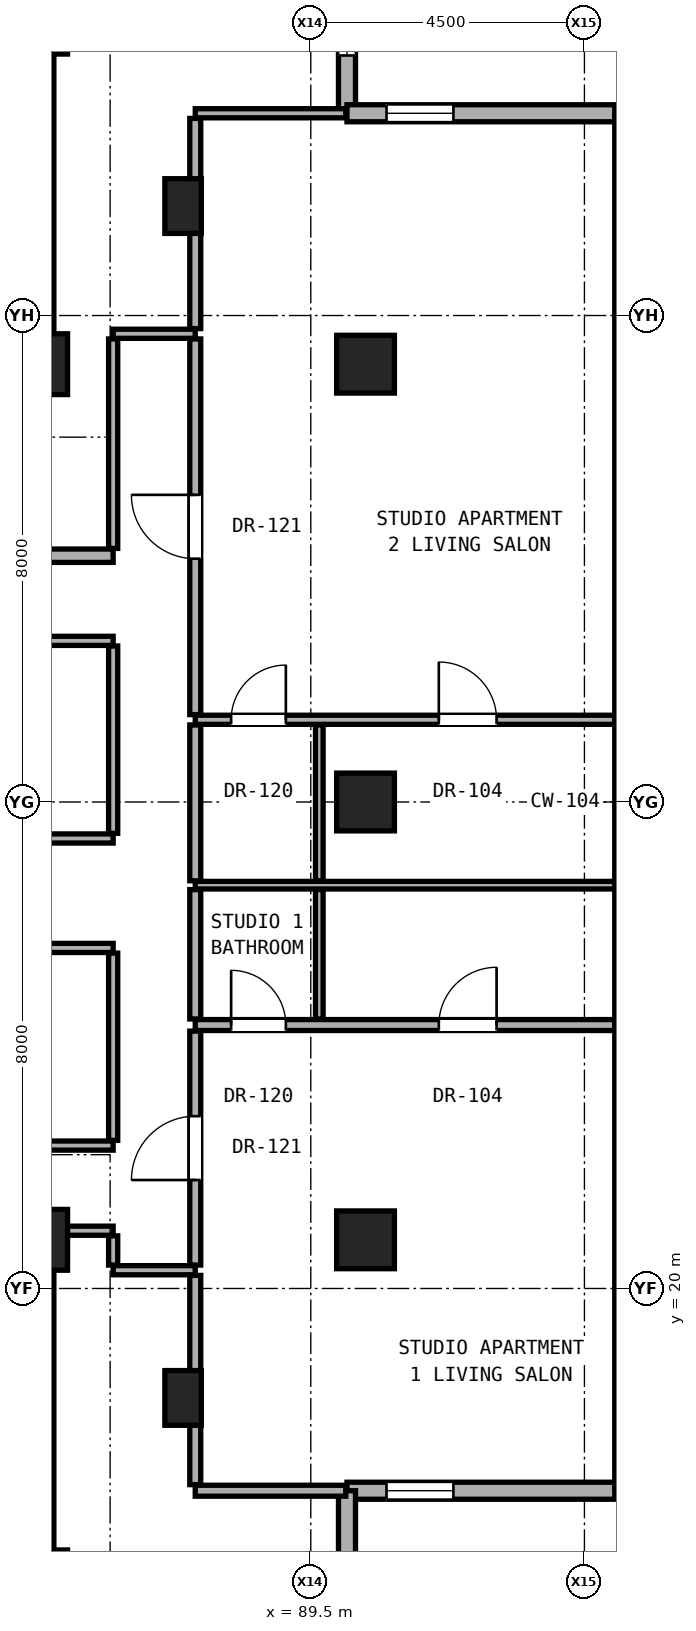
"""IFC4 building model, lengths in metres.
Left out: names, types, materials, properties, quantities, classifications, styles, units other than length and angle.
Written with IfcOpenShell. Run it as: python <this file> out.ifc"""

import sys

from ifc_helpers import new_model, si_unit, direction, frame, frame_2d, origin, origin_2d, place, context, subcontext, project, spatial, rectangle, hollow_rectangle, extrude, element, fill, save


model = new_model("IFC4")
c1 = context("Model", 3, precision=1e-05, world=origin(), true_north=direction((0.0, 1.0)))
c2 = subcontext(c1, "Body", "Model", "MODEL_VIEW")
j1 = project(units=[si_unit("LENGTHUNIT", "METRE"), si_unit("PLANEANGLEUNIT", "RADIAN")], contexts=[c1])
p1 = place(None, origin())
s1 = spatial("IfcSite", under=j1, at=p1, CompositionType="ELEMENT")
p2 = place(p1, origin())
s2 = spatial("IfcBuilding", under=s1, at=p2, CompositionType="ELEMENT")
p3 = place(p2, frame((0.0, 0.0, 173.9)))
s3 = spatial("IfcBuildingStorey", under=s2, at=p3, CompositionType="ELEMENT", Elevation=173.9)
for number, where, z_axis, x_axis in (
    (1, (85.0, 15.2, 0.0), (0.0, 0.0, 1.0), (1.0, 0.0, 0.0)),
    (2, (85.0, 20.8, 0.0), (0.0, 0.0, 1.0), (1.0, 0.0, 0.0)),
    (3, (85.0, 35.2, 0.0), (0.0, 0.0, 1.0), (1.0, 0.0, 0.0)),
    (4, (85.0, 40.8, 0.0), (0.0, 0.0, 1.0), (1.0, 0.0, 0.0)),
):
    element("IfcColumn", number, at=place(p3, frame(where, z_axis=z_axis, x_axis=x_axis)), inside=s3, PredefinedType="COLUMN", context=c2, shape_type="SweptSolid", body=[
        extrude(rectangle(XDim=1.0, YDim=1.0, at=origin_2d()), origin(), (0.0, 0.0, 1.0), 3.25),
    ])
for number, where, z_axis, x_axis in (
    (5, (90.4, 20.8, 0.0), (0.0, 0.0, 1.0), (1.0, 0.0, 0.0)),
    (6, (90.4, 28.0, 0.0), (0.0, 0.0, 1.0), (1.0, 0.0, 0.0)),
    (7, (90.4, 35.2, 0.0), (0.0, 0.0, 1.0), (1.0, 0.0, 0.0)),
):
    element("IfcColumn", number, at=place(p3, frame(where, z_axis=z_axis, x_axis=x_axis)), inside=s3, PredefinedType="COLUMN", context=c2, shape_type="SweptSolid", body=[
        extrude(hollow_rectangle(XDim=0.95, YDim=0.95, WallThickness=0.05, at=origin_2d()), origin(), (0.0, 0.0, 1.0), 3.25),
    ])
for number, where, z_axis, x_axis in (
    (8, (87.4, 18.2, 0.0), (0.0, 0.0, 1.0), (1.0, 0.0, 0.0)),
    (9, (87.4, 37.8, 0.0), (0.0, 0.0, 1.0), (1.0, 0.0, 0.0)),
):
    element("IfcColumn", number, at=place(p3, frame(where, z_axis=z_axis, x_axis=x_axis)), inside=s3, PredefinedType="PILASTER", context=c2, shape_type="SweptSolid", body=[
        extrude(rectangle(XDim=0.6, YDim=0.9, at=origin_2d()), origin(), (0.0, 0.0, 1.0), 3.25),
    ])
for number, where, z_axis, x_axis in (
    (10, (85.0, 35.2, 0.0), (0.0, 0.0, 1.0), (0.0, 1.0, 0.0)),
    (11, (85.0, 15.2, 0.0), (0.0, 0.0, 1.0), (0.0, 1.0, 0.0)),
):
    element("IfcWall", number, at=place(p3, frame(where, z_axis=z_axis, x_axis=x_axis)), inside=s3, PredefinedType="SHEAR", context=c2, shape_type="SweptSolid", body=[
        extrude(rectangle(XDim=5.6, YDim=0.55, at=frame_2d((2.8, 0.0))), origin(), (0.0, 0.0, 1.0), 3.05),
    ])
p4 = place(p3, frame((90.095, 39.326, 0.0), z_axis=(0.0, 0.0, 1.0), x_axis=(0.0, 1.0, 0.0)))
e12 = element("IfcWall", 12, at=p4, inside=s3, PredefinedType="SOLIDWALL", context=c2, shape_type="SweptSolid", body=[
    extrude(rectangle(XDim=4.465, YDim=0.28, at=frame_2d((2.232, 0.0))), origin(), (0.0, 0.0, 1.0), 3.03),
])
p5 = place(p4, frame((0.95, 0.0, 0.85)))
e13 = element("IfcOpeningElement", 13, at=p5, cuts=e12, PredefinedType="OPENING", context=c2, shape_type="SweptSolid", body=[
    extrude(rectangle(XDim=1.1, YDim=2.0, at=frame_2d((0.55, 1.0))), frame((0.0, 0.15, 0.0), z_axis=(0.0, -1.0, 0.0), x_axis=(1.0, 0.0, 0.0)), (0.0, 0.0, 1.0), 0.3),
])
p6 = place(p3, frame((90.095, 16.674, 0.0), z_axis=(0.0, 0.0, 1.0), x_axis=(1.0, 0.0, 0.0)))
e14 = element("IfcWall", 14, at=p6, inside=s3, PredefinedType="SOLIDWALL", context=c2, shape_type="SweptSolid", body=[
    extrude(rectangle(XDim=4.465, YDim=0.28, at=frame_2d((2.233, 0.0))), origin(), (0.0, 0.0, 1.0), 3.03),
])
p7 = place(p6, frame((0.65, 0.0, 0.85)))
e15 = element("IfcOpeningElement", 15, at=p7, cuts=e14, PredefinedType="OPENING", context=c2, shape_type="SweptSolid", body=[
    extrude(rectangle(XDim=1.1, YDim=2.0, at=frame_2d((0.55, 1.0))), frame((0.0, 0.15, 0.0), z_axis=(0.0, -1.0, 0.0), x_axis=(1.0, 0.0, 0.0)), (0.0, 0.0, 1.0), 0.3),
])
p8 = place(p3, frame((90.095, 12.209, 0.0), z_axis=(0.0, 0.0, 1.0), x_axis=(0.0, 1.0, 0.0)))
e16 = element("IfcWall", 16, at=p8, inside=s3, PredefinedType="SOLIDWALL", context=c2, shape_type="SweptSolid", body=[
    extrude(rectangle(XDim=4.465, YDim=0.28, at=frame_2d((2.232, 0.0))), origin(), (0.0, 0.0, 1.0), 3.03),
])
p9 = place(p3, frame((94.561, 39.326, 0.0), z_axis=(0.0, 0.0, 1.0), x_axis=(-1.0, 0.0, 0.0)))
e17 = element("IfcWall", 17, at=p9, inside=s3, PredefinedType="SOLIDWALL", context=c2, shape_type="SweptSolid", body=[
    extrude(rectangle(XDim=4.465, YDim=0.28, at=frame_2d((2.233, 0.0))), origin(), (0.0, 0.0, 1.0), 3.03),
])
p10 = place(p9, frame((2.715, 0.0, 0.85)))
e18 = element("IfcOpeningElement", 18, at=p10, cuts=e17, PredefinedType="OPENING", context=c2, shape_type="SweptSolid", body=[
    extrude(rectangle(XDim=1.1, YDim=2.0, at=frame_2d((0.55, 1.0))), frame((0.0, 0.15, 0.0), z_axis=(0.0, -1.0, 0.0), x_axis=(1.0, 0.0, 0.0)), (0.0, 0.0, 1.0), 0.3),
])
p11 = place(p3, frame((87.6, 16.674, 0.0), z_axis=(0.0, 0.0, 1.0), x_axis=(1.0, 0.0, 0.0)))
e19 = element("IfcWall", 19, at=p11, inside=s3, PredefinedType="PARTITIONING", context=c2, shape_type="SweptSolid", body=[
    extrude(rectangle(XDim=2.475, YDim=0.18, at=frame_2d((1.238, 0.0))), origin(), (0.0, 0.0, 1.0), 3.05),
])
p12 = place(p3, frame((86.25, 20.3, 0.0), z_axis=(0.0, 0.0, 1.0), x_axis=(1.0, 0.0, 0.0)))
e20 = element("IfcWall", 20, at=p12, inside=s3, PredefinedType="PARTITIONING", context=c2, shape_type="SweptSolid", body=[
    extrude(rectangle(XDim=1.35, YDim=0.15, at=frame_2d((0.675, 0.0))), origin(), (0.0, 0.0, 1.0), 3.05),
])
p13 = place(p3, frame((85.27, 20.95, 0.0), z_axis=(0.0, 0.0, 1.0), x_axis=(1.0, 0.0, 0.0)))
e21 = element("IfcWall", 21, at=p13, inside=s3, PredefinedType="PARTITIONING", context=c2, shape_type="SweptSolid", body=[
    extrude(rectangle(XDim=0.98, YDim=0.15, at=frame_2d((0.49, 0.0))), origin(), (0.0, 0.0, 1.0), 2.442),
])
p14 = place(p3, frame((78.64, 22.35, 0.0), z_axis=(0.0, 0.0, 1.0), x_axis=(1.0, 0.0, 0.0)))
e22 = element("IfcWall", 22, at=p14, inside=s3, PredefinedType="PARTITIONING", context=c2, shape_type="SweptSolid", body=[
    extrude(rectangle(XDim=7.61, YDim=0.15, at=frame_2d((3.805, 0.0))), origin(), (0.0, 0.0, 1.0), 2.186),
])
p15 = place(p14, frame((3.33, 0.0, 0.0)))
e23 = element("IfcOpeningElement", 23, at=p15, cuts=e22, PredefinedType="OPENING", context=c2, shape_type="SweptSolid", body=[
    extrude(rectangle(XDim=0.95, YDim=2.15, at=frame_2d((0.475, 1.075))), frame((0.0, 0.085, 0.0), z_axis=(0.0, -1.0, 0.0), x_axis=(1.0, 0.0, 0.0)), (0.0, 0.0, 1.0), 0.17),
])
p16 = place(p3, frame((87.6, 24.332, 0.0), z_axis=(0.0, 0.0, 1.0), x_axis=(1.0, 0.0, 0.0)))
e24 = element("IfcWall", 24, at=p16, inside=s3, PredefinedType="PARTITIONING", context=c2, shape_type="SweptSolid", body=[
    extrude(rectangle(XDim=6.961, YDim=0.18, at=frame_2d((3.48, 0.0))), origin(), (0.0, 0.0, 1.0), 2.269),
])
p17 = place(p16, frame((4.006, 0.0, 0.0)))
e25 = element("IfcOpeningElement", 25, at=p17, cuts=e24, PredefinedType="OPENING", context=c2, shape_type="SweptSolid", body=[
    extrude(rectangle(XDim=0.95, YDim=2.15, at=frame_2d((0.475, 1.075))), frame((0.0, 0.1, 0.0), z_axis=(0.0, -1.0, 0.0), x_axis=(1.0, 0.0, 0.0)), (0.0, 0.0, 1.0), 0.2),
])
p18 = place(p16, frame((0.59, 0.0, 0.0)))
e26 = element("IfcOpeningElement", 26, at=p18, cuts=e24, PredefinedType="OPENING", context=c2, shape_type="SweptSolid", body=[
    extrude(rectangle(XDim=0.9, YDim=2.1, at=frame_2d((0.45, 1.05))), frame((0.0, 0.1, 0.0), z_axis=(0.0, -1.0, 0.0), x_axis=(1.0, 0.0, 0.0)), (0.0, 0.0, 1.0), 0.2),
])
p19 = place(p3, frame((78.6, 25.6, 0.0), z_axis=(0.0, 0.0, 1.0), x_axis=(1.0, 0.0, 0.0)))
e27 = element("IfcWall", 27, at=p19, inside=s3, PredefinedType="PARTITIONING", context=c2, shape_type="SweptSolid", body=[
    extrude(rectangle(XDim=7.65, YDim=0.15, at=frame_2d((3.825, 0.0))), origin(), (0.0, 0.0, 1.0), 2.186),
])
p20 = place(p3, frame((87.6, 26.632, 0.0), z_axis=(0.0, 0.0, 1.0), x_axis=(1.0, 0.0, 0.0)))
e28 = element("IfcWall", 28, at=p20, inside=s3, PredefinedType="PARTITIONING", context=c2, shape_type="SweptSolid", body=[
    extrude(rectangle(XDim=6.961, YDim=0.125, at=frame_2d((3.48, 0.0))), origin(), (0.0, 0.0, 1.0), 2.269),
])
p21 = place(p3, frame((78.6, 27.4, 0.0), z_axis=(0.0, 0.0, 1.0), x_axis=(1.0, 0.0, 0.0)))
e29 = element("IfcWall", 29, at=p21, inside=s3, PredefinedType="PARTITIONING", context=c2, shape_type="SweptSolid", body=[
    extrude(rectangle(XDim=7.65, YDim=0.15, at=frame_2d((3.825, 0.0))), origin(), (0.0, 0.0, 1.0), 2.186),
])
p22 = place(p3, frame((87.6, 29.352, 0.0), z_axis=(0.0, 0.0, 1.0), x_axis=(1.0, 0.0, 0.0)))
e30 = element("IfcWall", 30, at=p22, inside=s3, PredefinedType="PARTITIONING", context=c2, shape_type="SweptSolid", body=[
    extrude(rectangle(XDim=6.961, YDim=0.15, at=frame_2d((3.48, 0.0))), origin(), (0.0, 0.0, 1.0), 2.269),
])
p23 = place(p22, frame((4.006, 0.0, 0.0)))
e31 = element("IfcOpeningElement", 31, at=p23, cuts=e30, PredefinedType="OPENING", context=c2, shape_type="SweptSolid", body=[
    extrude(rectangle(XDim=0.95, YDim=2.15, at=frame_2d((0.475, 1.075))), frame((0.0, 0.085, 0.0), z_axis=(0.0, -1.0, 0.0), x_axis=(1.0, 0.0, 0.0)), (0.0, 0.0, 1.0), 0.17),
])
p24 = place(p22, frame((0.59, 0.0, 0.0)))
e32 = element("IfcOpeningElement", 32, at=p24, cuts=e30, PredefinedType="OPENING", context=c2, shape_type="SweptSolid", body=[
    extrude(rectangle(XDim=0.9, YDim=2.1, at=frame_2d((0.45, 1.05))), frame((0.0, 0.085, 0.0), z_axis=(0.0, -1.0, 0.0), x_axis=(1.0, 0.0, 0.0)), (0.0, 0.0, 1.0), 0.17),
])
p25 = place(p3, frame((78.64, 30.65, 0.0), z_axis=(0.0, 0.0, 1.0), x_axis=(1.0, 0.0, 0.0)))
e33 = element("IfcWall", 33, at=p25, inside=s3, PredefinedType="PARTITIONING", context=c2, shape_type="SweptSolid", body=[
    extrude(rectangle(XDim=7.61, YDim=0.15, at=frame_2d((3.805, 0.0))), origin(), (0.0, 0.0, 1.0), 2.186),
])
p26 = place(p25, frame((3.33, 0.0, 0.0)))
e34 = element("IfcOpeningElement", 34, at=p26, cuts=e33, PredefinedType="OPENING", context=c2, shape_type="SweptSolid", body=[
    extrude(rectangle(XDim=0.95, YDim=2.15, at=frame_2d((0.475, 1.075))), frame((0.0, 0.085, 0.0), z_axis=(0.0, -1.0, 0.0), x_axis=(1.0, 0.0, 0.0)), (0.0, 0.0, 1.0), 0.17),
])
p27 = place(p3, frame((71.55, 32.05, 0.0), z_axis=(0.0, 0.0, 1.0), x_axis=(1.0, 0.0, 0.0)))
e35 = element("IfcWall", 35, at=p27, inside=s3, PredefinedType="SOLIDWALL", context=c2, shape_type="SweptSolid", body=[
    extrude(rectangle(XDim=14.7, YDim=0.22, at=frame_2d((7.35, 0.0))), origin(), (0.0, 0.0, 1.0), 2.186),
])
p28 = place(p27, frame((6.065, 0.0, 0.0)))
e36 = element("IfcOpeningElement", 36, at=p28, cuts=e35, PredefinedType="OPENING", context=c2, shape_type="SweptSolid", body=[
    extrude(rectangle(XDim=0.85, YDim=2.01, at=frame_2d((0.425, 1.005))), frame((0.0, 0.12, 0.0), z_axis=(0.0, -1.0, 0.0), x_axis=(1.0, 0.0, 0.0)), (0.0, 0.0, 1.0), 0.24),
])
p29 = place(p27, frame((10.535, 0.0, 0.0)))
e37 = element("IfcOpeningElement", 37, at=p29, cuts=e35, PredefinedType="OPENING", context=c2, shape_type="SweptSolid", body=[
    extrude(rectangle(XDim=0.95, YDim=2.15, at=frame_2d((0.475, 1.075))), frame((0.0, 0.12, 0.0), z_axis=(0.0, -1.0, 0.0), x_axis=(1.0, 0.0, 0.0)), (0.0, 0.0, 1.0), 0.24),
])
p30 = place(p27, frame((1.65, 0.0, 0.0)))
e38 = element("IfcOpeningElement", 38, at=p30, cuts=e35, PredefinedType="OPENING", context=c2, shape_type="SweptSolid", body=[
    extrude(rectangle(XDim=0.85, YDim=2.01, at=frame_2d((0.425, 1.005))), frame((0.0, 0.12, 0.0), z_axis=(0.0, -1.0, 0.0), x_axis=(1.0, 0.0, 0.0)), (0.0, 0.0, 1.0), 0.24),
])
p31 = place(p3, frame((86.25, 35.7, 0.0), z_axis=(0.0, 0.0, 1.0), x_axis=(1.0, 0.0, 0.0)))
e39 = element("IfcWall", 39, at=p31, inside=s3, PredefinedType="PARTITIONING", context=c2, shape_type="SweptSolid", body=[
    extrude(rectangle(XDim=1.35, YDim=0.15, at=frame_2d((0.675, 0.0))), origin(), (0.0, 0.0, 1.0), 3.05),
])
p32 = place(p3, frame((87.6, 39.326, 0.0), z_axis=(0.0, 0.0, 1.0), x_axis=(1.0, 0.0, 0.0)))
e40 = element("IfcWall", 40, at=p32, inside=s3, PredefinedType="PARTITIONING", context=c2, shape_type="SweptSolid", body=[
    extrude(rectangle(XDim=2.475, YDim=0.15, at=frame_2d((1.238, 0.0))), origin(), (0.0, 0.0, 1.0), 3.05),
])
p33 = place(p3, frame((86.25, 20.385, 0.0), z_axis=(0.0, 0.0, 1.0), x_axis=(0.0, 1.0, 0.0)))
e41 = element("IfcWall", 41, at=p33, inside=s3, PredefinedType="PARTITIONING", context=c2, shape_type="SweptSolid", body=[
    extrude(rectangle(XDim=0.48, YDim=0.15, at=frame_2d((0.24, 0.0))), origin(), (0.0, 0.0, 1.0), 2.442),
])
p34 = place(p3, frame((86.25, 22.435, 0.0), z_axis=(0.0, 0.0, 1.0), x_axis=(0.0, 1.0, 0.0)))
e42 = element("IfcWall", 42, at=p34, inside=s3, PredefinedType="PARTITIONING", context=c2, shape_type="SweptSolid", body=[
    extrude(rectangle(XDim=3.08, YDim=0.15, at=frame_2d((1.54, 0.0))), origin(), (0.0, 0.0, 1.0), 3.05),
])
p35 = place(p3, frame((86.25, 27.485, 0.0), z_axis=(0.0, 0.0, 1.0), x_axis=(0.0, 1.0, 0.0)))
e43 = element("IfcWall", 43, at=p35, inside=s3, PredefinedType="PARTITIONING", context=c2, shape_type="SweptSolid", body=[
    extrude(rectangle(XDim=3.08, YDim=0.15, at=frame_2d((1.54, 0.0))), origin(), (0.0, 0.0, 1.0), 2.346),
])
p36 = place(p3, frame((86.25, 32.17, 0.0), z_axis=(0.0, 0.0, 1.0), x_axis=(0.0, 1.0, 0.0)))
e44 = element("IfcWall", 44, at=p36, inside=s3, PredefinedType="PARTITIONING", context=c2, shape_type="SweptSolid", body=[
    extrude(rectangle(XDim=3.445, YDim=0.15, at=frame_2d((1.723, 0.0))), origin(), (0.0, 0.0, 1.0), 2.442),
])
p37 = place(p3, frame((87.6, 16.774, 0.0), z_axis=(0.0, 0.0, 1.0), x_axis=(0.0, 1.0, 0.0)))
e45 = element("IfcWall", 45, at=p37, inside=s3, PredefinedType="PARTITIONING", context=c2, shape_type="SweptSolid", body=[
    extrude(rectangle(XDim=3.441, YDim=0.18, at=frame_2d((1.721, 0.0))), origin(), (0.0, 0.0, 1.0), 2.493),
])
p38 = place(p3, frame((87.6, 20.385, 0.0), z_axis=(0.0, 0.0, 1.0), x_axis=(0.0, 1.0, 0.0)))
e46 = element("IfcWall", 46, at=p38, inside=s3, PredefinedType="PARTITIONING", context=c2, shape_type="SweptSolid", body=[
    extrude(rectangle(XDim=3.847, YDim=0.18, at=frame_2d((1.923, 0.0))), origin(), (0.0, 0.0, 1.0), 2.442),
])
p39 = place(p38, frame((1.398, 0.0, 0.0)))
e47 = element("IfcOpeningElement", 47, at=p39, cuts=e46, PredefinedType="OPENING", context=c2, shape_type="SweptSolid", body=[
    extrude(rectangle(XDim=1.05, YDim=2.2, at=frame_2d((0.525, 1.1))), frame((0.0, 0.1, 0.0), z_axis=(0.0, -1.0, 0.0), x_axis=(1.0, 0.0, 0.0)), (0.0, 0.0, 1.0), 0.2),
])
p40 = place(p3, frame((87.6, 24.432, 0.0), z_axis=(0.0, 0.0, 1.0), x_axis=(0.0, 1.0, 0.0)))
e48 = element("IfcWall", 48, at=p40, inside=s3, PredefinedType="PARTITIONING", context=c2, shape_type="SweptSolid", body=[
    extrude(rectangle(XDim=2.128, YDim=0.18, at=frame_2d((1.064, 0.0))), origin(), (0.0, 0.0, 1.0), 3.05),
])
p41 = place(p3, frame((87.6, 26.705, 0.0), z_axis=(0.0, 0.0, 1.0), x_axis=(0.0, 1.0, 0.0)))
e49 = element("IfcWall", 49, at=p41, inside=s3, PredefinedType="PARTITIONING", context=c2, shape_type="SweptSolid", body=[
    extrude(rectangle(XDim=2.562, YDim=0.18, at=frame_2d((1.281, 0.0))), origin(), (0.0, 0.0, 1.0), 2.346),
])
p42 = place(p3, frame((87.6, 29.437, 0.0), z_axis=(0.0, 0.0, 1.0), x_axis=(0.0, 1.0, 0.0)))
e50 = element("IfcWall", 50, at=p42, inside=s3, PredefinedType="PARTITIONING", context=c2, shape_type="SweptSolid", body=[
    extrude(rectangle(XDim=6.178, YDim=0.18, at=frame_2d((3.089, 0.0))), origin(), (0.0, 0.0, 1.0), 2.442),
])
p43 = place(p42, frame((2.564, 0.0, 0.0)))
e51 = element("IfcOpeningElement", 51, at=p43, cuts=e50, PredefinedType="OPENING", context=c2, shape_type="SweptSolid", body=[
    extrude(rectangle(XDim=1.05, YDim=2.2, at=frame_2d((0.525, 1.1))), frame((0.0, 0.1, 0.0), z_axis=(0.0, -1.0, 0.0), x_axis=(1.0, 0.0, 0.0)), (0.0, 0.0, 1.0), 0.2),
])
p44 = place(p3, frame((87.6, 35.785, 0.0), z_axis=(0.0, 0.0, 1.0), x_axis=(0.0, 1.0, 0.0)))
e52 = element("IfcWall", 52, at=p44, inside=s3, PredefinedType="PARTITIONING", context=c2, shape_type="SweptSolid", body=[
    extrude(rectangle(XDim=3.456, YDim=0.18, at=frame_2d((1.728, 0.0))), origin(), (0.0, 0.0, 1.0), 2.493),
])
p45 = place(p3, frame((89.64, 24.432, 0.0), z_axis=(0.0, 0.0, 1.0), x_axis=(0.0, 1.0, 0.0)))
e53 = element("IfcWall", 53, at=p45, inside=s3, PredefinedType="PARTITIONING", context=c2, shape_type="SweptSolid", body=[
    extrude(rectangle(XDim=2.128, YDim=0.125, at=frame_2d((1.064, 0.0))), origin(), (0.0, 0.0, 1.0), 3.05),
])
p46 = place(p3, frame((89.64, 26.705, 0.0), z_axis=(0.0, 0.0, 1.0), x_axis=(0.0, 1.0, 0.0)))
e54 = element("IfcWall", 54, at=p46, inside=s3, PredefinedType="PARTITIONING", context=c2, shape_type="SweptSolid", body=[
    extrude(rectangle(XDim=2.562, YDim=0.125, at=frame_2d((1.281, 0.0))), origin(), (0.0, 0.0, 1.0), 2.346),
])
p47 = place(p5, origin())
e55 = element("IfcWindow", 55, at=p47, inside=s3, PartitioningType="SINGLE_PANEL", PredefinedType="WINDOW", context=c2, shape_type="SweptSolid", body=[
    extrude(rectangle(XDim=1.1, YDim=2.0, at=frame_2d((0.55, 1.0))), frame((0.0, 0.03, 0.0), z_axis=(0.0, -1.0, 0.0), x_axis=(1.0, 0.0, 0.0)), (0.0, 0.0, 1.0), 0.06),
])
fill(e13, e55)
p48 = place(p7, origin())
e56 = element("IfcWindow", 56, at=p48, inside=s3, PartitioningType="SINGLE_PANEL", PredefinedType="WINDOW", context=c2, shape_type="SweptSolid", body=[
    extrude(rectangle(XDim=1.1, YDim=2.0, at=frame_2d((0.55, 1.0))), frame((0.0, 0.03, 0.0), z_axis=(0.0, -1.0, 0.0), x_axis=(1.0, 0.0, 0.0)), (0.0, 0.0, 1.0), 0.06),
])
fill(e15, e56)
p49 = place(p10, origin())
e57 = element("IfcWindow", 57, at=p49, inside=s3, PartitioningType="SINGLE_PANEL", PredefinedType="WINDOW", context=c2, shape_type="SweptSolid", body=[
    extrude(rectangle(XDim=1.1, YDim=2.0, at=frame_2d((0.55, 1.0))), frame((0.0, 0.03, 0.0), z_axis=(0.0, -1.0, 0.0), x_axis=(1.0, 0.0, 0.0)), (0.0, 0.0, 1.0), 0.06),
])
fill(e18, e57)
p50 = place(p39, origin())
e58 = element("IfcDoor", 58, at=p50, inside=s3, OperationType="SINGLE_SWING_LEFT", PredefinedType="DOOR", context=c2, shape_type="SweptSolid", body=[
    extrude(rectangle(XDim=1.05, YDim=2.2, at=frame_2d((0.525, 1.1))), frame((0.0, 0.025, 0.0), z_axis=(0.0, -1.0, 0.0), x_axis=(1.0, 0.0, 0.0)), (0.0, 0.0, 1.0), 0.05),
])
fill(e47, e58)
p51 = place(p17, origin())
e59 = element("IfcDoor", 59, at=p51, inside=s3, OperationType="SINGLE_SWING_RIGHT", PredefinedType="DOOR", context=c2, shape_type="SweptSolid", body=[
    extrude(rectangle(XDim=0.95, YDim=2.15, at=frame_2d((0.475, 1.075))), frame((0.0, 0.025, 0.0), z_axis=(0.0, -1.0, 0.0), x_axis=(1.0, 0.0, 0.0)), (0.0, 0.0, 1.0), 0.05),
])
fill(e25, e59)
p52 = place(p18, origin())
e60 = element("IfcDoor", 60, at=p52, inside=s3, OperationType="SINGLE_SWING_LEFT", PredefinedType="DOOR", context=c2, shape_type="SweptSolid", body=[
    extrude(rectangle(XDim=0.9, YDim=2.1, at=frame_2d((0.45, 1.05))), frame((0.0, 0.025, 0.0), z_axis=(0.0, -1.0, 0.0), x_axis=(1.0, 0.0, 0.0)), (0.0, 0.0, 1.0), 0.05),
])
fill(e26, e60)
p53 = place(p43, origin())
e61 = element("IfcDoor", 61, at=p53, inside=s3, OperationType="SINGLE_SWING_RIGHT", PredefinedType="DOOR", context=c2, shape_type="SweptSolid", body=[
    extrude(rectangle(XDim=1.05, YDim=2.2, at=frame_2d((0.525, 1.1))), frame((0.0, 0.025, 0.0), z_axis=(0.0, -1.0, 0.0), x_axis=(1.0, 0.0, 0.0)), (0.0, 0.0, 1.0), 0.05),
])
fill(e51, e61)
p54 = place(p23, origin())
e62 = element("IfcDoor", 62, at=p54, inside=s3, OperationType="SINGLE_SWING_LEFT", PredefinedType="DOOR", context=c2, shape_type="SweptSolid", body=[
    extrude(rectangle(XDim=0.95, YDim=2.15, at=frame_2d((0.475, 1.075))), frame((0.0, 0.025, 0.0), z_axis=(0.0, -1.0, 0.0), x_axis=(1.0, 0.0, 0.0)), (0.0, 0.0, 1.0), 0.05),
])
fill(e31, e62)
p55 = place(p24, origin())
e63 = element("IfcDoor", 63, at=p55, inside=s3, OperationType="SINGLE_SWING_RIGHT", PredefinedType="DOOR", context=c2, shape_type="SweptSolid", body=[
    extrude(rectangle(XDim=0.9, YDim=2.1, at=frame_2d((0.45, 1.05))), frame((0.0, 0.025, 0.0), z_axis=(0.0, -1.0, 0.0), x_axis=(1.0, 0.0, 0.0)), (0.0, 0.0, 1.0), 0.05),
])
fill(e32, e63)
save(model, sys.argv[1])
